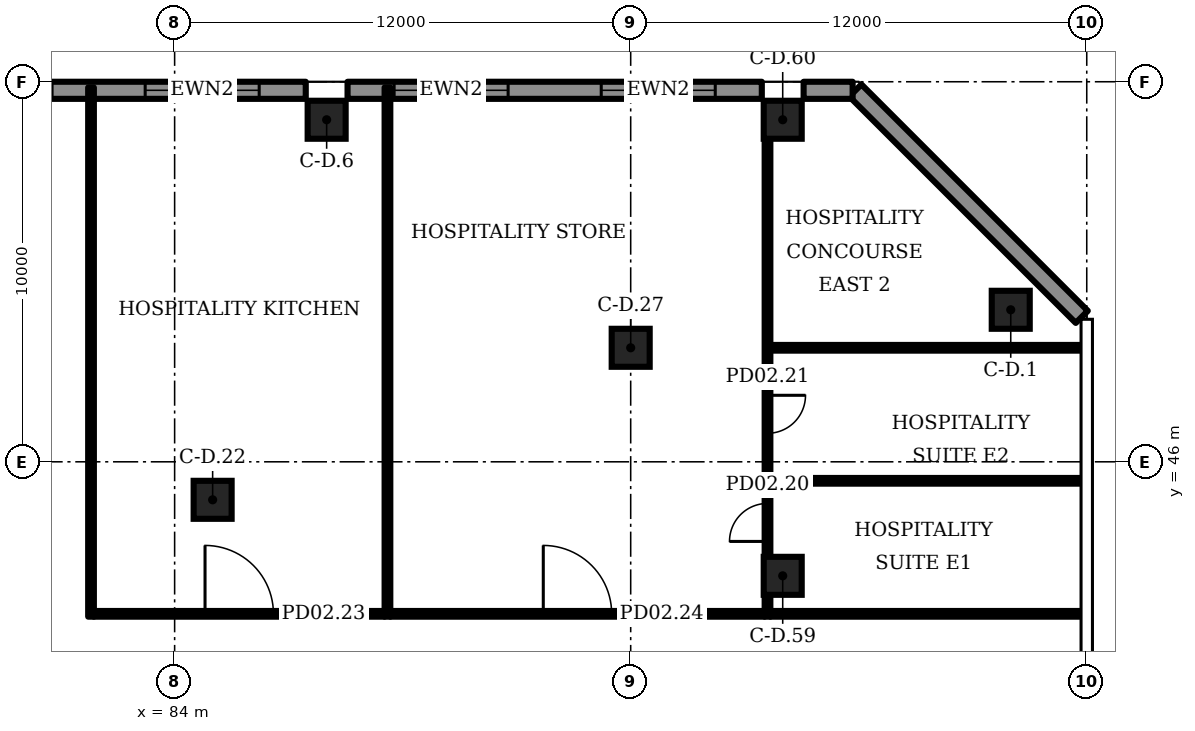
"""IFC4 building model, lengths in metres.
Left out: names, types, materials, properties, quantities, classifications, styles, units other than length and angle.
Written with IfcOpenShell. Run it as: python <this file> out.ifc"""

import sys

from ifc_helpers import new_model, si_unit, direction, frame, frame_2d, origin, origin_2d, place, context, subcontext, project, spatial, rectangle, extrude, element, fill, save


model = new_model("IFC4")
c1 = context("Model", 3, precision=1e-05, world=origin(), true_north=direction((0.0, 1.0)))
c2 = subcontext(c1, "Body", "Model", "MODEL_VIEW")
j1 = project(units=[si_unit("LENGTHUNIT", "METRE"), si_unit("PLANEANGLEUNIT", "RADIAN")], contexts=[c1])
p1 = place(None, origin())
s1 = spatial("IfcSite", under=j1, at=p1, CompositionType="ELEMENT")
p2 = place(p1, origin())
s2 = spatial("IfcBuilding", under=s1, at=p2, CompositionType="ELEMENT")
p3 = place(p2, frame((0.0, 0.0, 15.0)))
s3 = spatial("IfcBuildingStorey", under=s2, at=p3, CompositionType="ELEMENT", Elevation=15.0)
for number, where, z_axis, x_axis in (
    (1, (106.0, 50.0, 0.0), (0.0, 0.0, 1.0), (1.0, 0.0, 0.0)),
    (2, (88.0, 55.0, 0.0), (0.0, 0.0, 1.0), (1.0, 0.0, 0.0)),
    (3, (85.0, 45.0, 0.0), (0.0, 0.0, 1.0), (1.0, 0.0, 0.0)),
    (4, (96.0, 49.0, 0.0), (0.0, 0.0, 1.0), (1.0, 0.0, 0.0)),
    (5, (100.0, 43.0, 0.0), (0.0, 0.0, 1.0), (1.0, 0.0, 0.0)),
    (6, (100.0, 55.0, 0.0), (0.0, 0.0, 1.0), (1.0, 0.0, 0.0)),
):
    element("IfcColumn", number, at=place(p3, frame(where, z_axis=z_axis, x_axis=x_axis)), inside=s3, PredefinedType="COLUMN", context=c2, shape_type="SweptSolid", body=[
        extrude(rectangle(XDim=1.0, YDim=1.0, at=origin_2d()), origin(), (0.0, 0.0, 1.0), 6.5),
    ])
p4 = place(p3, frame((107.869, 49.812, 0.0), z_axis=(0.0, 0.0, 1.0), x_axis=(-0.707092, 0.707121, 0.0)))
e7 = element("IfcWall", 7, at=p4, inside=s3, PredefinedType="SOLIDWALL", context=c2, shape_type="SweptSolid", body=[
    extrude(rectangle(XDim=8.425, YDim=0.45, at=frame_2d((4.213, 0.0))), origin(), (0.0, 0.0, 1.0), 6.2),
])
p5 = place(p3, frame((99.45, 55.775, 0.0), z_axis=(0.0, 0.0, 1.0), x_axis=(-1.0, 0.0, 0.0)))
e8 = element("IfcWall", 8, at=p5, inside=s3, PredefinedType="SOLIDWALL", context=c2, shape_type="SweptSolid", body=[
    extrude(rectangle(XDim=10.9, YDim=0.45, at=frame_2d((5.45, 0.0))), origin(), (0.0, 0.0, 1.0), 6.2),
])
p6 = place(p5, frame((1.225, 0.0, 1.0)))
e9 = element("IfcOpeningElement", 9, at=p6, cuts=e8, PredefinedType="OPENING", context=c2, shape_type="SweptSolid", body=[
    extrude(rectangle(XDim=3.0, YDim=4.2, at=frame_2d((1.5, 2.1))), frame((0.0, 0.235, 0.0), z_axis=(0.0, -1.0, 0.0), x_axis=(1.0, 0.0, 0.0)), (0.0, 0.0, 1.0), 0.47),
])
p7 = place(p5, frame((6.675, 0.0, 1.0)))
e10 = element("IfcOpeningElement", 10, at=p7, cuts=e8, PredefinedType="OPENING", context=c2, shape_type="SweptSolid", body=[
    extrude(rectangle(XDim=3.0, YDim=4.2, at=frame_2d((1.5, 2.1))), frame((0.0, 0.235, 0.0), z_axis=(0.0, -1.0, 0.0), x_axis=(1.0, 0.0, 0.0)), (0.0, 0.0, 1.0), 0.47),
])
p8 = place(p3, frame((87.45, 55.775, 0.0), z_axis=(0.0, 0.0, 1.0), x_axis=(-1.0, 0.0, 0.0)))
e11 = element("IfcWall", 11, at=p8, inside=s3, PredefinedType="SOLIDWALL", context=c2, shape_type="SweptSolid", body=[
    extrude(rectangle(XDim=10.9, YDim=0.45, at=frame_2d((5.45, 0.0))), origin(), (0.0, 0.0, 1.0), 6.2),
])
p9 = place(p8, frame((1.225, 0.0, 1.0)))
e12 = element("IfcOpeningElement", 12, at=p9, cuts=e11, PredefinedType="OPENING", context=c2, shape_type="SweptSolid", body=[
    extrude(rectangle(XDim=3.0, YDim=4.2, at=frame_2d((1.5, 2.1))), frame((0.0, 0.235, 0.0), z_axis=(0.0, -1.0, 0.0), x_axis=(1.0, 0.0, 0.0)), (0.0, 0.0, 1.0), 0.47),
])
p10 = place(p8, frame((6.675, 0.0, 1.0)))
e13 = element("IfcOpeningElement", 13, at=p10, cuts=e11, PredefinedType="OPENING", context=c2, shape_type="SweptSolid", body=[
    extrude(rectangle(XDim=3.0, YDim=4.2, at=frame_2d((1.5, 2.1))), frame((0.0, 0.235, 0.0), z_axis=(0.0, -1.0, 0.0), x_axis=(1.0, 0.0, 0.0)), (0.0, 0.0, 1.0), 0.47),
])
p11 = place(p3, frame((101.84, 55.775, 0.0), z_axis=(0.0, 0.0, 1.0), x_axis=(-1.0, 0.0, 0.0)))
e14 = element("IfcWall", 14, at=p11, inside=s3, PredefinedType="SOLIDWALL", context=c2, shape_type="SweptSolid", body=[
    extrude(rectangle(XDim=1.29, YDim=0.45, at=frame_2d((0.645, 0.0))), origin(), (0.0, 0.0, 1.0), 6.2),
])
p12 = place(p3, frame((81.875, 42.0, 0.0), z_axis=(0.0, 0.0, 1.0), x_axis=(1.0, 0.0, 0.0)))
e15 = element("IfcWall", 15, at=p12, inside=s3, PredefinedType="PARTITIONING", context=c2, shape_type="SweptSolid", body=[
    extrude(rectangle(XDim=7.65, YDim=0.15, at=frame_2d((3.825, 0.0))), origin(), (0.0, 0.0, 1.0), 6.2),
])
p13 = place(p12, frame((2.925, 0.0, 0.0)))
e16 = element("IfcOpeningElement", 16, at=p13, cuts=e15, PredefinedType="OPENING", context=c2, shape_type="SweptSolid", body=[
    extrude(rectangle(XDim=1.8, YDim=2.1, at=frame_2d((0.9, 1.05))), frame((0.0, 0.085, 0.0), z_axis=(0.0, -1.0, 0.0), x_axis=(1.0, 0.0, 0.0)), (0.0, 0.0, 1.0), 0.17),
])
p14 = place(p3, frame((89.675, 42.0, 0.0), z_axis=(0.0, 0.0, 1.0), x_axis=(1.0, 0.0, 0.0)))
e17 = element("IfcWall", 17, at=p14, inside=s3, PredefinedType="PARTITIONING", context=c2, shape_type="SweptSolid", body=[
    extrude(rectangle(XDim=9.85, YDim=0.15, at=frame_2d((4.925, 0.0))), origin(), (0.0, 0.0, 1.0), 6.2),
])
p15 = place(p14, frame((4.025, 0.0, 0.0)))
e18 = element("IfcOpeningElement", 18, at=p15, cuts=e17, PredefinedType="OPENING", context=c2, shape_type="SweptSolid", body=[
    extrude(rectangle(XDim=1.8, YDim=2.1, at=frame_2d((0.9, 1.05))), frame((0.0, 0.085, 0.0), z_axis=(0.0, -1.0, 0.0), x_axis=(1.0, 0.0, 0.0)), (0.0, 0.0, 1.0), 0.17),
])
for number, where, z_axis, x_axis in (
    (19, (99.675, 42.0, 0.0), (0.0, 0.0, 1.0), (1.0, 0.0, 0.0)),
    (20, (99.675, 45.5, 0.0), (0.0, 0.0, 1.0), (1.0, 0.0, 0.0)),
):
    element("IfcWall", number, at=place(p3, frame(where, z_axis=z_axis, x_axis=x_axis)), inside=s3, PredefinedType="PARTITIONING", context=c2, shape_type="SweptSolid", body=[
        extrude(rectangle(XDim=8.22, YDim=0.15, at=frame_2d((4.11, 0.0))), origin(), (0.0, 0.0, 1.0), 6.2),
    ])
p16 = place(p3, frame((99.6, 41.925, 0.0), z_axis=(0.0, 0.0, 1.0), x_axis=(0.0, 1.0, 0.0)))
e21 = element("IfcWall", 21, at=p16, inside=s3, PredefinedType="PARTITIONING", context=c2, shape_type="SweptSolid", body=[
    extrude(rectangle(XDim=0.565, YDim=0.15, at=frame_2d((0.282, 0.0))), origin(), (0.0, 0.0, 1.0), 6.2),
])
p17 = place(p3, frame((99.6, 43.51, 0.0), z_axis=(0.0, 0.0, 1.0), x_axis=(0.0, 1.0, 0.0)))
e22 = element("IfcWall", 22, at=p17, inside=s3, PredefinedType="PARTITIONING", context=c2, shape_type="SweptSolid", body=[
    extrude(rectangle(XDim=10.98, YDim=0.15, at=frame_2d((5.49, 0.0))), origin(), (0.0, 0.0, 1.0), 6.2),
])
p18 = place(p17, frame((0.395, 0.0, 0.0)))
e23 = element("IfcOpeningElement", 23, at=p18, cuts=e22, PredefinedType="OPENING", context=c2, shape_type="SweptSolid", body=[
    extrude(rectangle(XDim=1.0, YDim=2.1, at=frame_2d((0.5, 1.05))), frame((0.0, 0.085, 0.0), z_axis=(0.0, -1.0, 0.0), x_axis=(1.0, 0.0, 0.0)), (0.0, 0.0, 1.0), 0.17),
])
p19 = place(p17, frame((3.24, 0.0, 0.0)))
e24 = element("IfcOpeningElement", 24, at=p19, cuts=e22, PredefinedType="OPENING", context=c2, shape_type="SweptSolid", body=[
    extrude(rectangle(XDim=1.0, YDim=2.1, at=frame_2d((0.5, 1.05))), frame((0.0, 0.085, 0.0), z_axis=(0.0, -1.0, 0.0), x_axis=(1.0, 0.0, 0.0)), (0.0, 0.0, 1.0), 0.17),
])
p20 = place(p3, frame((99.675, 49.0, 0.0), z_axis=(0.0, 0.0, 1.0), x_axis=(1.0, 0.0, 0.0)))
e25 = element("IfcWall", 25, at=p20, inside=s3, PredefinedType="PARTITIONING", context=c2, shape_type="SweptSolid", body=[
    extrude(rectangle(XDim=8.22, YDim=0.15, at=frame_2d((4.11, 0.0))), origin(), (0.0, 0.0, 1.0), 6.2),
])
for number, where, z_axis, x_axis in (
    (26, (89.6, 41.925, 0.0), (0.0, 0.0, 1.0), (0.0, 1.0, 0.0)),
    (27, (81.8, 41.925, 0.0), (0.0, 0.0, 1.0), (0.0, 1.0, 0.0)),
):
    element("IfcWall", number, at=place(p3, frame(where, z_axis=z_axis, x_axis=x_axis)), inside=s3, PredefinedType="PARTITIONING", context=c2, shape_type="SweptSolid", body=[
        extrude(rectangle(XDim=13.925, YDim=0.15, at=frame_2d((6.962, 0.0))), origin(), (0.0, 0.0, 1.0), 6.2),
    ])
p21 = place(p6, origin())
e28 = element("IfcWindow", 28, at=p21, inside=s3, PartitioningType="SINGLE_PANEL", PredefinedType="WINDOW", context=c2, shape_type="SweptSolid", body=[
    extrude(rectangle(XDim=3.0, YDim=4.2, at=frame_2d((1.5, 2.1))), frame((0.0, 0.105, 0.0), z_axis=(0.0, -1.0, 0.0), x_axis=(1.0, 0.0, 0.0)), (0.0, 0.0, 1.0), 0.06),
])
fill(e9, e28)
p22 = place(p7, origin())
e29 = element("IfcWindow", 29, at=p22, inside=s3, PartitioningType="SINGLE_PANEL", PredefinedType="WINDOW", context=c2, shape_type="SweptSolid", body=[
    extrude(rectangle(XDim=3.0, YDim=4.2, at=frame_2d((1.5, 2.1))), frame((0.0, 0.105, 0.0), z_axis=(0.0, -1.0, 0.0), x_axis=(1.0, 0.0, 0.0)), (0.0, 0.0, 1.0), 0.06),
])
fill(e10, e29)
p23 = place(p9, origin())
e30 = element("IfcWindow", 30, at=p23, inside=s3, PartitioningType="SINGLE_PANEL", PredefinedType="WINDOW", context=c2, shape_type="SweptSolid", body=[
    extrude(rectangle(XDim=3.0, YDim=4.2, at=frame_2d((1.5, 2.1))), frame((0.0, 0.105, 0.0), z_axis=(0.0, -1.0, 0.0), x_axis=(1.0, 0.0, 0.0)), (0.0, 0.0, 1.0), 0.06),
])
fill(e12, e30)
p24 = place(p18, origin())
e31 = element("IfcDoor", 31, at=p24, inside=s3, OperationType="SINGLE_SWING_LEFT", PredefinedType="DOOR", context=c2, shape_type="SweptSolid", body=[
    extrude(rectangle(XDim=1.0, YDim=2.1, at=frame_2d((0.5, 1.05))), frame((0.0, 0.025, 0.0), z_axis=(0.0, -1.0, 0.0), x_axis=(1.0, 0.0, 0.0)), (0.0, 0.0, 1.0), 0.05),
])
fill(e23, e31)
p25 = place(p19, origin())
e32 = element("IfcDoor", 32, at=p25, inside=s3, OperationType="SINGLE_SWING_RIGHT", PredefinedType="DOOR", context=c2, shape_type="SweptSolid", body=[
    extrude(rectangle(XDim=1.0, YDim=2.1, at=frame_2d((0.5, 1.05))), frame((0.0, 0.025, 0.0), z_axis=(0.0, -1.0, 0.0), x_axis=(1.0, 0.0, 0.0)), (0.0, 0.0, 1.0), 0.05),
])
fill(e24, e32)
p26 = place(p13, origin())
e33 = element("IfcDoor", 33, at=p26, inside=s3, OperationType="DOUBLE_DOOR_SINGLE_SWING", PredefinedType="DOOR", context=c2, shape_type="SweptSolid", body=[
    extrude(rectangle(XDim=1.8, YDim=2.1, at=frame_2d((0.9, 1.05))), frame((0.0, 0.025, 0.0), z_axis=(0.0, -1.0, 0.0), x_axis=(1.0, 0.0, 0.0)), (0.0, 0.0, 1.0), 0.05),
])
fill(e16, e33)
p27 = place(p15, origin())
e34 = element("IfcDoor", 34, at=p27, inside=s3, OperationType="DOUBLE_DOOR_SINGLE_SWING", PredefinedType="DOOR", context=c2, shape_type="SweptSolid", body=[
    extrude(rectangle(XDim=1.8, YDim=2.1, at=frame_2d((0.9, 1.05))), frame((0.0, 0.025, 0.0), z_axis=(0.0, -1.0, 0.0), x_axis=(1.0, 0.0, 0.0)), (0.0, 0.0, 1.0), 0.05),
])
fill(e18, e34)
save(model, sys.argv[1])
